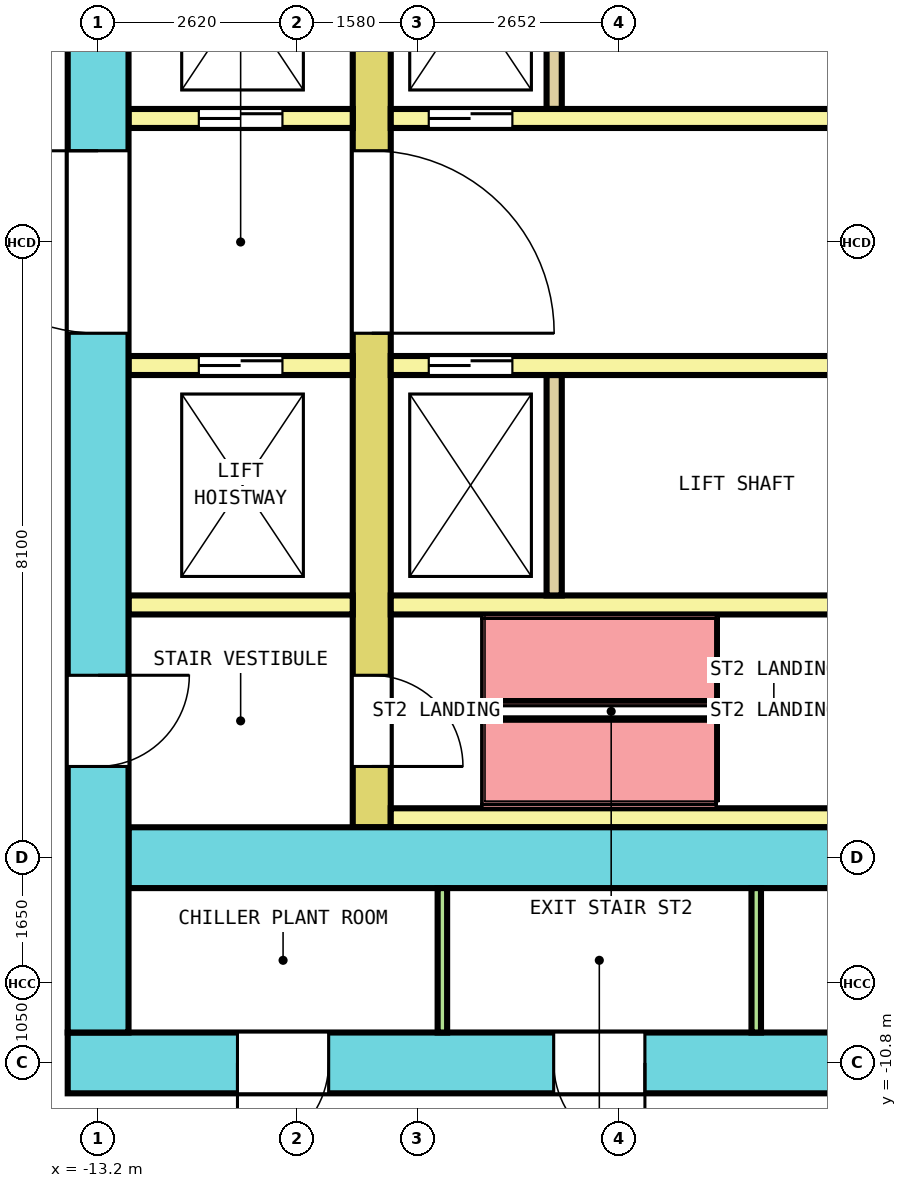
"""IFC4 building model, lengths in metres.
Left out: names, types, materials, properties, quantities, classifications, styles, units other than length and angle.
Written with IfcOpenShell. Run it as: python <this file> out.ifc"""

import sys

from ifc_helpers import new_model, si_unit, direction, frame, frame_2d, origin, place, context, subcontext, project, spatial, rectangle, extrude, element, fill, save


model = new_model("IFC4")
c1 = context("Model", 3, precision=1e-05, world=origin(), true_north=direction((0.0, 1.0)))
c2 = subcontext(c1, "Body", "Model", "MODEL_VIEW")
j1 = project(units=[si_unit("LENGTHUNIT", "METRE"), si_unit("PLANEANGLEUNIT", "RADIAN")], contexts=[c1])
p1 = place(None, origin())
s1 = spatial("IfcSite", under=j1, at=p1, CompositionType="ELEMENT")
p2 = place(p1, origin())
s2 = spatial("IfcBuilding", under=s1, at=p2, CompositionType="ELEMENT")
p3 = place(p2, frame((0.0, 0.0, 71.8)))
s3 = spatial("IfcBuildingStorey", under=s2, at=p3, CompositionType="ELEMENT", Elevation=71.8)
p4 = place(p3, frame((-13.6, -10.8, 0.0), z_axis=(0.0, 0.0, 1.0), x_axis=(1.0, 0.0, 0.0)))
e1 = element("IfcWall", 1, at=p4, inside=s3, PredefinedType="SHEAR", context=c2, shape_type="SweptSolid", body=[
    extrude(rectangle(XDim=27.2, YDim=0.8, at=frame_2d((13.6, 0.0))), origin(), (0.0, 0.0, 1.0), 8.7),
])
p5 = place(p4, frame((2.233, 0.0, 0.0)))
e2 = element("IfcOpeningElement", 2, at=p5, cuts=e1, PredefinedType="OPENING", context=c2, shape_type="SweptSolid", body=[
    extrude(rectangle(XDim=1.2, YDim=2.1, at=frame_2d((0.6, 1.05))), frame((0.0, 0.41, 0.0), z_axis=(0.0, -1.0, 0.0), x_axis=(1.0, 0.0, 0.0)), (0.0, 0.0, 1.0), 0.82),
])
p6 = place(p4, frame((6.394, 0.0, 0.0)))
e3 = element("IfcOpeningElement", 3, at=p6, cuts=e1, PredefinedType="OPENING", context=c2, shape_type="SweptSolid", body=[
    extrude(rectangle(XDim=1.2, YDim=2.1, at=frame_2d((0.6, 1.05))), frame((0.0, 0.41, 0.0), z_axis=(0.0, -1.0, 0.0), x_axis=(1.0, 0.0, 0.0)), (0.0, 0.0, 1.0), 0.82),
])
p7 = place(p4, frame((10.523, 0.0, 0.0)))
e4 = element("IfcOpeningElement", 4, at=p7, cuts=e1, PredefinedType="OPENING", context=c2, shape_type="SweptSolid", body=[
    extrude(rectangle(XDim=1.2, YDim=2.1, at=frame_2d((0.6, 1.05))), frame((0.0, 0.41, 0.0), z_axis=(0.0, -1.0, 0.0), x_axis=(1.0, 0.0, 0.0)), (0.0, 0.0, 1.0), 0.82),
])
p8 = place(p4, frame((19.734, 0.0, 0.0)))
e5 = element("IfcOpeningElement", 5, at=p8, cuts=e1, PredefinedType="OPENING", context=c2, shape_type="SweptSolid", body=[
    extrude(rectangle(XDim=1.2, YDim=2.1, at=frame_2d((0.6, 1.05))), frame((0.0, 0.41, 0.0), z_axis=(0.0, -1.0, 0.0), x_axis=(1.0, 0.0, 0.0)), (0.0, 0.0, 1.0), 0.82),
])
p9 = place(p4, frame((23.809, 0.0, 0.0)))
e6 = element("IfcOpeningElement", 6, at=p9, cuts=e1, PredefinedType="OPENING", context=c2, shape_type="SweptSolid", body=[
    extrude(rectangle(XDim=1.2, YDim=2.1, at=frame_2d((0.6, 1.05))), frame((0.0, 0.41, 0.0), z_axis=(0.0, -1.0, 0.0), x_axis=(1.0, 0.0, 0.0)), (0.0, 0.0, 1.0), 0.82),
])
p10 = place(p4, frame((15.15, 0.0, 0.0)))
e7 = element("IfcOpeningElement", 7, at=p10, cuts=e1, PredefinedType="OPENING", context=c2, shape_type="SweptSolid", body=[
    extrude(rectangle(XDim=1.2, YDim=2.1, at=frame_2d((0.6, 1.05))), frame((0.0, 0.41, 0.0), z_axis=(0.0, -1.0, 0.0), x_axis=(1.0, 0.0, 0.0)), (0.0, 0.0, 1.0), 0.82),
])
p11 = place(p3, frame((-13.2, -10.4, 0.0), z_axis=(0.0, 0.0, 1.0), x_axis=(0.0, 1.0, 0.0)))
e8 = element("IfcWall", 8, at=p11, inside=s3, PredefinedType="SHEAR", context=c2, shape_type="SweptSolid", body=[
    extrude(rectangle(XDim=20.8, YDim=0.8, at=frame_2d((10.4, 0.0))), origin(), (0.0, 0.0, 1.0), 8.7),
])
p12 = place(p11, frame((9.2, 0.0, 0.0)))
e9 = element("IfcOpeningElement", 9, at=p12, cuts=e8, PredefinedType="OPENING", context=c2, shape_type="SweptSolid", body=[
    extrude(rectangle(XDim=2.4, YDim=2.1, at=frame_2d((1.2, 1.05))), frame((0.0, 0.41, 0.0), z_axis=(0.0, -1.0, 0.0), x_axis=(1.0, 0.0, 0.0)), (0.0, 0.0, 1.0), 0.82),
])
p13 = place(p11, frame((16.1, 0.0, 0.0)))
e10 = element("IfcOpeningElement", 10, at=p13, cuts=e8, PredefinedType="OPENING", context=c2, shape_type="SweptSolid", body=[
    extrude(rectangle(XDim=1.2, YDim=2.1, at=frame_2d((0.6, 1.05))), frame((0.0, 0.41, 0.0), z_axis=(0.0, -1.0, 0.0), x_axis=(1.0, 0.0, 0.0)), (0.0, 0.0, 1.0), 0.82),
])
p14 = place(p11, frame((3.5, 0.0, 0.0)))
e11 = element("IfcOpeningElement", 11, at=p14, cuts=e8, PredefinedType="OPENING", context=c2, shape_type="SweptSolid", body=[
    extrude(rectangle(XDim=1.2, YDim=2.1, at=frame_2d((0.6, 1.05))), frame((0.0, 0.41, 0.0), z_axis=(0.0, -1.0, 0.0), x_axis=(1.0, 0.0, 0.0)), (0.0, 0.0, 1.0), 0.82),
])
p15 = place(p3, frame((-12.8, -8.1, 0.0), z_axis=(0.0, 0.0, 1.0), x_axis=(1.0, 0.0, 0.0)))
e12 = element("IfcWall", 12, at=p15, inside=s3, PredefinedType="SHEAR", context=c2, shape_type="SweptSolid", body=[
    extrude(rectangle(XDim=25.6, YDim=0.8, at=frame_2d((12.8, 0.0))), origin(), (0.0, 0.0, 1.0), 8.7),
])
p16 = place(p15, frame((14.35, 0.0, 0.0)))
e13 = element("IfcOpeningElement", 13, at=p16, cuts=e12, PredefinedType="OPENING", context=c2, shape_type="SweptSolid", body=[
    extrude(rectangle(XDim=1.2, YDim=2.1, at=frame_2d((0.6, 1.05))), frame((0.0, 0.41, 0.0), z_axis=(0.0, -1.0, 0.0), x_axis=(1.0, 0.0, 0.0)), (0.0, 0.0, 1.0), 0.82),
])
p17 = place(p3, frame((-9.6, -7.7, 0.0), z_axis=(0.0, 0.0, 1.0), x_axis=(0.0, 1.0, 0.0)))
e14 = element("IfcWall", 14, at=p17, inside=s3, PredefinedType="SHEAR", context=c2, shape_type="SweptSolid", body=[
    extrude(rectangle(XDim=15.4, YDim=0.5, at=frame_2d((7.7, 0.0))), origin(), (0.0, 0.0, 1.0), 8.7),
])
p18 = place(p17, frame((6.5, 0.0, 0.0)))
e15 = element("IfcOpeningElement", 15, at=p18, cuts=e14, PredefinedType="OPENING", context=c2, shape_type="SweptSolid", body=[
    extrude(rectangle(XDim=2.4, YDim=2.1, at=frame_2d((1.2, 1.05))), frame((0.0, 0.26, 0.0), z_axis=(0.0, -1.0, 0.0), x_axis=(1.0, 0.0, 0.0)), (0.0, 0.0, 1.0), 0.52),
])
p19 = place(p17, frame((13.4, 0.0, 0.0)))
e16 = element("IfcOpeningElement", 16, at=p19, cuts=e14, PredefinedType="OPENING", context=c2, shape_type="SweptSolid", body=[
    extrude(rectangle(XDim=1.2, YDim=2.1, at=frame_2d((0.6, 1.05))), frame((0.0, 0.26, 0.0), z_axis=(0.0, -1.0, 0.0), x_axis=(1.0, 0.0, 0.0)), (0.0, 0.0, 1.0), 0.52),
])
p20 = place(p17, frame((0.8, 0.0, 0.0)))
e17 = element("IfcOpeningElement", 17, at=p20, cuts=e14, PredefinedType="OPENING", context=c2, shape_type="SweptSolid", body=[
    extrude(rectangle(XDim=1.2, YDim=2.1, at=frame_2d((0.6, 1.05))), frame((0.0, 0.26, 0.0), z_axis=(0.0, -1.0, 0.0), x_axis=(1.0, 0.0, 0.0)), (0.0, 0.0, 1.0), 0.52),
])
p21 = place(p3, frame((-12.8, 1.625, 0.0), z_axis=(0.0, 0.0, 1.0), x_axis=(1.0, 0.0, 0.0)))
e18 = element("IfcWall", 18, at=p21, inside=s3, PredefinedType="SOLIDWALL", context=c2, shape_type="SweptSolid", body=[
    extrude(rectangle(XDim=2.95, YDim=0.25, at=frame_2d((1.475, 0.0))), origin(), (0.0, 0.0, 1.0), 8.7),
])
p22 = place(p21, frame((0.925, 0.0, 0.0)))
e19 = element("IfcOpeningElement", 19, at=p22, cuts=e18, PredefinedType="OPENING", context=c2, shape_type="SweptSolid", body=[
    extrude(rectangle(XDim=1.1, YDim=2.1, at=frame_2d((0.55, 1.05))), frame((0.0, 0.135, 0.0), z_axis=(0.0, -1.0, 0.0), x_axis=(1.0, 0.0, 0.0)), (0.0, 0.0, 1.0), 0.27),
])
p23 = place(p3, frame((-9.35, 1.625, 0.0), z_axis=(0.0, 0.0, 1.0), x_axis=(1.0, 0.0, 0.0)))
e20 = element("IfcWall", 20, at=p23, inside=s3, PredefinedType="SOLIDWALL", context=c2, shape_type="SweptSolid", body=[
    extrude(rectangle(XDim=18.7, YDim=0.25, at=frame_2d((9.35, 0.0))), origin(), (0.0, 0.0, 1.0), 8.7),
])
p24 = place(p23, frame((0.5, 0.0, 0.0)))
e21 = element("IfcOpeningElement", 21, at=p24, cuts=e20, PredefinedType="OPENING", context=c2, shape_type="SweptSolid", body=[
    extrude(rectangle(XDim=1.1, YDim=2.1, at=frame_2d((0.55, 1.05))), frame((0.0, 0.135, 0.0), z_axis=(0.0, -1.0, 0.0), x_axis=(1.0, 0.0, 0.0)), (0.0, 0.0, 1.0), 0.27),
])
p25 = place(p23, frame((17.1, 0.0, 0.0)))
e22 = element("IfcOpeningElement", 22, at=p25, cuts=e20, PredefinedType="OPENING", context=c2, shape_type="SweptSolid", body=[
    extrude(rectangle(XDim=1.1, YDim=2.1, at=frame_2d((0.55, 1.05))), frame((0.0, 0.135, 0.0), z_axis=(0.0, -1.0, 0.0), x_axis=(1.0, 0.0, 0.0)), (0.0, 0.0, 1.0), 0.27),
])
p26 = place(p3, frame((-7.2, 1.75, 0.0), z_axis=(0.0, 0.0, 1.0), x_axis=(0.0, 1.0, 0.0)))
e23 = element("IfcWall", 23, at=p26, inside=s3, PredefinedType="SOLIDWALL", context=c2, shape_type="SweptSolid", body=[
    extrude(rectangle(XDim=2.9, YDim=0.2, at=frame_2d((1.45, 0.0))), origin(), (0.0, 0.0, 1.0), 8.7),
])
p27 = place(p3, frame((-12.8, -1.625, 0.0), z_axis=(0.0, 0.0, 1.0), x_axis=(1.0, 0.0, 0.0)))
e24 = element("IfcWall", 24, at=p27, inside=s3, PredefinedType="SOLIDWALL", context=c2, shape_type="SweptSolid", body=[
    extrude(rectangle(XDim=2.95, YDim=0.25, at=frame_2d((1.475, 0.0))), origin(), (0.0, 0.0, 1.0), 8.7),
])
p28 = place(p27, frame((0.925, 0.0, 0.0)))
e25 = element("IfcOpeningElement", 25, at=p28, cuts=e24, PredefinedType="OPENING", context=c2, shape_type="SweptSolid", body=[
    extrude(rectangle(XDim=1.1, YDim=2.1, at=frame_2d((0.55, 1.05))), frame((0.0, 0.135, 0.0), z_axis=(0.0, -1.0, 0.0), x_axis=(1.0, 0.0, 0.0)), (0.0, 0.0, 1.0), 0.27),
])
p29 = place(p3, frame((-9.35, -1.625, 0.0), z_axis=(0.0, 0.0, 1.0), x_axis=(1.0, 0.0, 0.0)))
e26 = element("IfcWall", 26, at=p29, inside=s3, PredefinedType="SOLIDWALL", context=c2, shape_type="SweptSolid", body=[
    extrude(rectangle(XDim=18.7, YDim=0.25, at=frame_2d((9.35, 0.0))), origin(), (0.0, 0.0, 1.0), 8.7),
])
p30 = place(p29, frame((0.5, 0.0, 0.0)))
e27 = element("IfcOpeningElement", 27, at=p30, cuts=e26, PredefinedType="OPENING", context=c2, shape_type="SweptSolid", body=[
    extrude(rectangle(XDim=1.1, YDim=2.1, at=frame_2d((0.55, 1.05))), frame((0.0, 0.135, 0.0), z_axis=(0.0, -1.0, 0.0), x_axis=(1.0, 0.0, 0.0)), (0.0, 0.0, 1.0), 0.27),
])
p31 = place(p29, frame((17.1, 0.0, 0.0)))
e28 = element("IfcOpeningElement", 28, at=p31, cuts=e26, PredefinedType="OPENING", context=c2, shape_type="SweptSolid", body=[
    extrude(rectangle(XDim=1.1, YDim=2.1, at=frame_2d((0.55, 1.05))), frame((0.0, 0.135, 0.0), z_axis=(0.0, -1.0, 0.0), x_axis=(1.0, 0.0, 0.0)), (0.0, 0.0, 1.0), 0.27),
])
p32 = place(p3, frame((-12.8, -4.775, 0.0), z_axis=(0.0, 0.0, 1.0), x_axis=(1.0, 0.0, 0.0)))
e29 = element("IfcWall", 29, at=p32, inside=s3, PredefinedType="SOLIDWALL", context=c2, shape_type="SweptSolid", body=[
    extrude(rectangle(XDim=2.95, YDim=0.25, at=frame_2d((1.475, 0.0))), origin(), (0.0, 0.0, 1.0), 8.7),
])
p33 = place(p3, frame((-9.35, -4.775, 0.0), z_axis=(0.0, 0.0, 1.0), x_axis=(1.0, 0.0, 0.0)))
e30 = element("IfcWall", 30, at=p33, inside=s3, PredefinedType="SOLIDWALL", context=c2, shape_type="SweptSolid", body=[
    extrude(rectangle(XDim=18.7, YDim=0.25, at=frame_2d((9.35, 0.0))), origin(), (0.0, 0.0, 1.0), 8.7),
])
p34 = place(p3, frame((-7.2, -4.65, 0.0), z_axis=(0.0, 0.0, 1.0), x_axis=(0.0, 1.0, 0.0)))
e31 = element("IfcWall", 31, at=p34, inside=s3, PredefinedType="SOLIDWALL", context=c2, shape_type="SweptSolid", body=[
    extrude(rectangle(XDim=2.9, YDim=0.2, at=frame_2d((1.45, 0.0))), origin(), (0.0, 0.0, 1.0), 8.7),
])
p35 = place(p3, frame((-9.35, -7.575, 0.0), z_axis=(0.0, 0.0, 1.0), x_axis=(1.0, 0.0, 0.0)))
e32 = element("IfcWall", 32, at=p35, inside=s3, PredefinedType="SOLIDWALL", context=c2, shape_type="SweptSolid", body=[
    extrude(rectangle(XDim=5.8, YDim=0.25, at=frame_2d((2.9, 0.0))), origin(), (0.0, 0.0, 1.0), 8.7),
])
for number, where, z_axis, x_axis in (
    (33, (-8.671, -10.4, 0.0), (0.0, 0.0, 1.0), (0.0, 1.0, 0.0)),
    (34, (-4.542, -10.4, 0.0), (0.0, 0.0, 1.0), (0.0, 1.0, 0.0)),
):
    element("IfcWall", number, at=place(p3, frame(where, z_axis=z_axis, x_axis=x_axis)), inside=s3, PredefinedType="PARTITIONING", context=c2, shape_type="SweptSolid", body=[
        extrude(rectangle(XDim=1.9, YDim=0.125, at=frame_2d((0.95, 0.0))), origin(), (0.0, 0.0, 1.0), 8.7),
    ])
p36 = place(p22, origin())
e35 = element("IfcDoor", 35, at=p36, inside=s3, OperationType="DOUBLE_DOOR_SLIDING", PredefinedType="DOOR", context=c2, shape_type="SweptSolid", body=[
    extrude(rectangle(XDim=1.1, YDim=2.1, at=frame_2d((0.55, 1.05))), frame((0.0, 0.075, 0.0), z_axis=(0.0, -1.0, 0.0), x_axis=(1.0, 0.0, 0.0)), (0.0, 0.0, 1.0), 0.15),
])
fill(e19, e35)
p37 = place(p24, origin())
e36 = element("IfcDoor", 36, at=p37, inside=s3, OperationType="DOUBLE_DOOR_SLIDING", PredefinedType="DOOR", context=c2, shape_type="SweptSolid", body=[
    extrude(rectangle(XDim=1.1, YDim=2.1, at=frame_2d((0.55, 1.05))), frame((0.0, 0.075, 0.0), z_axis=(0.0, -1.0, 0.0), x_axis=(1.0, 0.0, 0.0)), (0.0, 0.0, 1.0), 0.15),
])
fill(e21, e36)
p38 = place(p28, origin())
e37 = element("IfcDoor", 37, at=p38, inside=s3, OperationType="DOUBLE_DOOR_SLIDING", PredefinedType="DOOR", context=c2, shape_type="SweptSolid", body=[
    extrude(rectangle(XDim=1.1, YDim=2.1, at=frame_2d((0.55, 1.05))), frame((0.0, 0.075, 0.0), z_axis=(0.0, -1.0, 0.0), x_axis=(1.0, 0.0, 0.0)), (0.0, 0.0, 1.0), 0.15),
])
fill(e25, e37)
p39 = place(p30, origin())
e38 = element("IfcDoor", 38, at=p39, inside=s3, OperationType="DOUBLE_DOOR_SLIDING", PredefinedType="DOOR", context=c2, shape_type="SweptSolid", body=[
    extrude(rectangle(XDim=1.1, YDim=2.1, at=frame_2d((0.55, 1.05))), frame((0.0, 0.075, 0.0), z_axis=(0.0, -1.0, 0.0), x_axis=(1.0, 0.0, 0.0)), (0.0, 0.0, 1.0), 0.15),
])
fill(e27, e38)
p40 = place(p18, origin())
e39 = element("IfcDoor", 39, at=p40, inside=s3, OperationType="DOUBLE_DOOR_SINGLE_SWING", PredefinedType="DOOR", context=c2, shape_type="SweptSolid", body=[
    extrude(rectangle(XDim=2.4, YDim=2.1, at=frame_2d((1.2, 1.05))), frame((0.0, 0.2, 0.0), z_axis=(0.0, -1.0, 0.0), x_axis=(1.0, 0.0, 0.0)), (0.0, 0.0, 1.0), 0.4),
])
fill(e15, e39)
p41 = place(p12, origin())
e40 = element("IfcDoor", 40, at=p41, inside=s3, OperationType="DOUBLE_DOOR_SINGLE_SWING", PredefinedType="DOOR", context=c2, shape_type="SweptSolid", body=[
    extrude(rectangle(XDim=2.4, YDim=2.1, at=frame_2d((1.2, 1.05))), frame((0.0, 0.3, 0.0), z_axis=(0.0, -1.0, 0.0), x_axis=(1.0, 0.0, 0.0)), (0.0, 0.0, 1.0), 0.6),
])
fill(e9, e40)
p42 = place(p20, origin())
e41 = element("IfcDoor", 41, at=p42, inside=s3, OperationType="SINGLE_SWING_RIGHT", PredefinedType="DOOR", context=c2, shape_type="SweptSolid", body=[
    extrude(rectangle(XDim=1.2, YDim=2.1, at=frame_2d((0.6, 1.05))), frame((0.0, 0.2, 0.0), z_axis=(0.0, -1.0, 0.0), x_axis=(1.0, 0.0, 0.0)), (0.0, 0.0, 1.0), 0.4),
])
fill(e17, e41)
p43 = place(p14, origin())
e42 = element("IfcDoor", 42, at=p43, inside=s3, OperationType="SINGLE_SWING_LEFT", PredefinedType="DOOR", context=c2, shape_type="SweptSolid", body=[
    extrude(rectangle(XDim=1.2, YDim=2.1, at=frame_2d((0.6, 1.05))), frame((0.0, 0.3, 0.0), z_axis=(0.0, -1.0, 0.0), x_axis=(1.0, 0.0, 0.0)), (0.0, 0.0, 1.0), 0.6),
])
fill(e11, e42)
p44 = place(p5, origin())
e43 = element("IfcDoor", 43, at=p44, inside=s3, OperationType="SINGLE_SWING_LEFT", PredefinedType="DOOR", context=c2, shape_type="SweptSolid", body=[
    extrude(rectangle(XDim=1.2, YDim=2.1, at=frame_2d((0.6, 1.05))), frame((0.0, 0.3, 0.0), z_axis=(0.0, -1.0, 0.0), x_axis=(1.0, 0.0, 0.0)), (0.0, 0.0, 1.0), 0.6),
])
fill(e2, e43)
p45 = place(p6, origin())
e44 = element("IfcDoor", 44, at=p45, inside=s3, OperationType="SINGLE_SWING_RIGHT", PredefinedType="DOOR", context=c2, shape_type="SweptSolid", body=[
    extrude(rectangle(XDim=1.2, YDim=2.1, at=frame_2d((0.6, 1.05))), frame((0.0, 0.3, 0.0), z_axis=(0.0, -1.0, 0.0), x_axis=(1.0, 0.0, 0.0)), (0.0, 0.0, 1.0), 0.6),
])
fill(e3, e44)
save(model, sys.argv[1])
